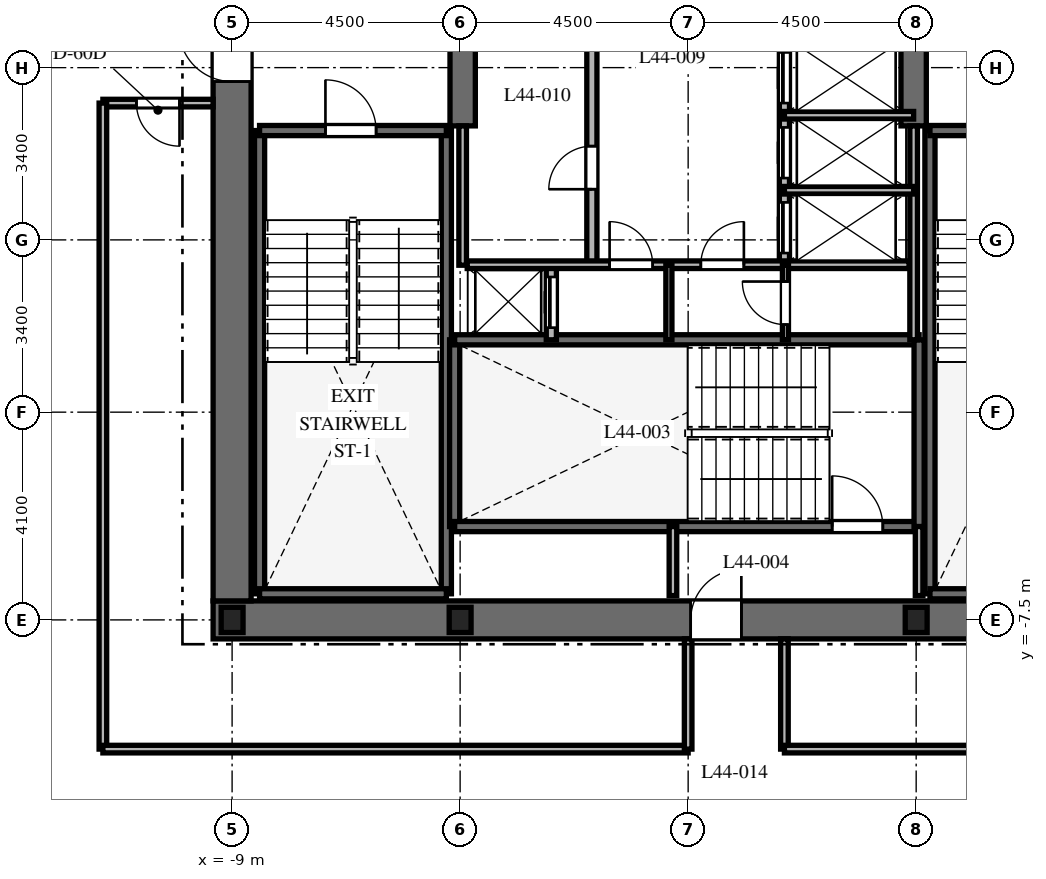
"""IFC4 building model, lengths in metres.
Left out: names, types, materials, properties, quantities, classifications, styles, units other than length and angle.
Written with IfcOpenShell. Run it as: python <this file> out.ifc"""

import sys

from ifc_helpers import new_model, si_unit, direction, frame, frame_2d, origin, origin_2d, place, context, subcontext, project, spatial, rectangle, i_section, extrude, element, fill, save


model = new_model("IFC4")
c1 = context("Model", 3, precision=1e-05, world=origin(), true_north=direction((0.0, 1.0)))
c2 = subcontext(c1, "Body", "Model", "MODEL_VIEW")
j1 = project(units=[si_unit("LENGTHUNIT", "METRE"), si_unit("PLANEANGLEUNIT", "RADIAN")], contexts=[c1])
p1 = place(None, origin())
s1 = spatial("IfcSite", under=j1, at=p1, CompositionType="ELEMENT")
p2 = place(p1, origin())
s2 = spatial("IfcBuilding", under=s1, at=p2, CompositionType="ELEMENT")
p3 = place(p2, frame((0.0, 0.0, 179.3)))
s3 = spatial("IfcBuildingStorey", under=s2, at=p3, CompositionType="ELEMENT", Elevation=179.3)
p4 = place(p3, frame((-9.375, -7.5, 0.0), z_axis=(0.0, 0.0, 1.0), x_axis=(1.0, 0.0, 0.0)))
e1 = element("IfcWall", 1, at=p4, inside=s3, PredefinedType="SHEAR", context=c2, shape_type="SweptSolid", body=[
    extrude(rectangle(XDim=18.75, YDim=0.75, at=frame_2d((9.375, 0.0))), origin(), (0.0, 0.0, 1.0), 3.7),
])
p5 = place(p4, frame((9.425, 0.0, 0.0)))
e2 = element("IfcOpeningElement", 2, at=p5, cuts=e1, PredefinedType="OPENING", context=c2, shape_type="SweptSolid", body=[
    extrude(rectangle(XDim=1.0, YDim=2.15, at=frame_2d((0.5, 1.075))), frame((0.0, 0.385, 0.0), z_axis=(0.0, -1.0, 0.0), x_axis=(1.0, 0.0, 0.0)), (0.0, 0.0, 1.0), 0.77),
])
p6 = place(p3, frame((-9.0, -7.125, 0.0), z_axis=(0.0, 0.0, 1.0), x_axis=(0.0, 1.0, 0.0)))
e3 = element("IfcWall", 3, at=p6, inside=s3, PredefinedType="SHEAR", context=c2, shape_type="SweptSolid", body=[
    extrude(rectangle(XDim=14.25, YDim=0.75, at=frame_2d((7.125, 0.0))), origin(), (0.0, 0.0, 1.0), 3.7),
])
p7 = place(p6, frame((10.25, 0.0, 0.0)))
e4 = element("IfcOpeningElement", 4, at=p7, cuts=e3, PredefinedType="OPENING", context=c2, shape_type="SweptSolid", body=[
    extrude(rectangle(XDim=1.05, YDim=2.15, at=frame_2d((0.525, 1.075))), frame((0.0, 0.385, 0.0), z_axis=(0.0, -1.0, 0.0), x_axis=(1.0, 0.0, 0.0)), (0.0, 0.0, 1.0), 0.77),
])
for number, where, z_axis, x_axis in (
    (5, (-4.45, 2.25, 0.0), (0.0, 0.0, 1.0), (0.0, 1.0, 0.0)),
    (6, (4.45, 2.25, 0.0), (0.0, 0.0, 1.0), (0.0, 1.0, 0.0)),
):
    element("IfcWall", number, at=place(p3, frame(where, z_axis=z_axis, x_axis=x_axis)), inside=s3, PredefinedType="SHEAR", context=c2, shape_type="SweptSolid", body=[
        extrude(rectangle(XDim=4.875, YDim=0.5, at=frame_2d((2.438, 0.0))), origin(), (0.0, 0.0, 1.0), 3.7),
    ])
for number, where, z_axis, x_axis in (
    (7, (-8.458, -6.985, 0.0), (0.0, 0.0, 1.0), (0.0, 1.0, 0.0)),
    (8, (-4.772, -6.985, 0.0), (0.0, 0.0, 1.0), (0.0, 1.0, 0.0)),
):
    element("IfcWall", number, at=place(p3, frame(where, z_axis=z_axis, x_axis=x_axis)), inside=s3, PredefinedType="SHEAR", context=c2, shape_type="SweptSolid", body=[
        extrude(rectangle(XDim=9.143, YDim=0.2, at=frame_2d((4.572, 0.0))), origin(), (0.0, 0.0, 1.0), 3.7),
    ])
p8 = place(p3, frame((-8.458, -6.985, 0.0), z_axis=(0.0, 0.0, 1.0), x_axis=(1.0, 0.0, 0.0)))
e9 = element("IfcWall", 9, at=p8, inside=s3, PredefinedType="SHEAR", context=c2, shape_type="SweptSolid", body=[
    extrude(rectangle(XDim=3.686, YDim=0.2, at=frame_2d((1.843, 0.0))), origin(), (0.0, 0.0, 1.0), 3.7),
])
p9 = place(p3, frame((-8.458, 2.158, 0.0), z_axis=(0.0, 0.0, 1.0), x_axis=(1.0, 0.0, 0.0)))
e10 = element("IfcWall", 10, at=p9, inside=s3, PredefinedType="SHEAR", context=c2, shape_type="SweptSolid", body=[
    extrude(rectangle(XDim=3.686, YDim=0.2, at=frame_2d((1.843, 0.0))), origin(), (0.0, 0.0, 1.0), 3.7),
])
p10 = place(p9, frame((1.3, 0.0, 0.0)))
e11 = element("IfcOpeningElement", 11, at=p10, cuts=e10, PredefinedType="OPENING", context=c2, shape_type="SweptSolid", body=[
    extrude(rectangle(XDim=1.0, YDim=2.15, at=frame_2d((0.5, 1.075))), frame((0.0, 0.11, 0.0), z_axis=(0.0, -1.0, 0.0), x_axis=(1.0, 0.0, 0.0)), (0.0, 0.0, 1.0), 0.22),
])
p11 = place(p3, frame((4.772, -6.985, 0.0), z_axis=(0.0, 0.0, 1.0), x_axis=(0.0, 1.0, 0.0)))
e12 = element("IfcWall", 12, at=p11, inside=s3, PredefinedType="SHEAR", context=c2, shape_type="SweptSolid", body=[
    extrude(rectangle(XDim=9.143, YDim=0.2, at=frame_2d((4.572, 0.0))), origin(), (0.0, 0.0, 1.0), 3.7),
])
p12 = place(p3, frame((4.772, -6.985, 0.0), z_axis=(0.0, 0.0, 1.0), x_axis=(1.0, 0.0, 0.0)))
e13 = element("IfcWall", 13, at=p12, inside=s3, PredefinedType="SHEAR", context=c2, shape_type="SweptSolid", body=[
    extrude(rectangle(XDim=3.686, YDim=0.2, at=frame_2d((1.843, 0.0))), origin(), (0.0, 0.0, 1.0), 3.7),
])
p13 = place(p3, frame((4.772, 2.158, 0.0), z_axis=(0.0, 0.0, 1.0), x_axis=(1.0, 0.0, 0.0)))
e14 = element("IfcWall", 14, at=p13, inside=s3, PredefinedType="SHEAR", context=c2, shape_type="SweptSolid", body=[
    extrude(rectangle(XDim=3.686, YDim=0.2, at=frame_2d((1.843, 0.0))), origin(), (0.0, 0.0, 1.0), 3.7),
])
p14 = place(p13, frame((1.35, 0.0, 0.0)))
e15 = element("IfcOpeningElement", 15, at=p14, cuts=e14, PredefinedType="OPENING", context=c2, shape_type="SweptSolid", body=[
    extrude(rectangle(XDim=1.0, YDim=2.15, at=frame_2d((0.5, 1.075))), frame((0.0, 0.11, 0.0), z_axis=(0.0, -1.0, 0.0), x_axis=(1.0, 0.0, 0.0)), (0.0, 0.0, 1.0), 0.22),
])
p15 = place(p3, frame((-4.608, -5.658, 0.0), z_axis=(0.0, 0.0, 1.0), x_axis=(0.0, 1.0, 0.0)))
e16 = element("IfcWall", 16, at=p15, inside=s3, PredefinedType="SHEAR", context=c2, shape_type="SweptSolid", body=[
    extrude(rectangle(XDim=3.686, YDim=0.2, at=frame_2d((1.843, 0.0))), origin(), (0.0, 0.0, 1.0), 3.7),
])
p16 = place(p3, frame((-4.608, -5.658, 0.0), z_axis=(0.0, 0.0, 1.0), x_axis=(1.0, 0.0, 0.0)))
e17 = element("IfcWall", 17, at=p16, inside=s3, PredefinedType="SHEAR", context=c2, shape_type="SweptSolid", body=[
    extrude(rectangle(XDim=9.166, YDim=0.2, at=frame_2d((4.583, 0.0))), origin(), (0.0, 0.0, 1.0), 3.7),
])
p17 = place(p16, frame((7.45, 0.0, 0.0)))
e18 = element("IfcOpeningElement", 18, at=p17, cuts=e17, PredefinedType="OPENING", context=c2, shape_type="SweptSolid", body=[
    extrude(rectangle(XDim=1.0, YDim=2.15, at=frame_2d((0.5, 1.075))), frame((0.0, 0.11, 0.0), z_axis=(0.0, -1.0, 0.0), x_axis=(1.0, 0.0, 0.0)), (0.0, 0.0, 1.0), 0.22),
])
p18 = place(p3, frame((-4.608, -1.972, 0.0), z_axis=(0.0, 0.0, 1.0), x_axis=(1.0, 0.0, 0.0)))
e19 = element("IfcWall", 19, at=p18, inside=s3, PredefinedType="SHEAR", context=c2, shape_type="SweptSolid", body=[
    extrude(rectangle(XDim=9.166, YDim=0.2, at=frame_2d((4.583, 0.0))), origin(), (0.0, 0.0, 1.0), 3.7),
])
p19 = place(p3, frame((4.558, -5.658, 0.0), z_axis=(0.0, 0.0, 1.0), x_axis=(0.0, 1.0, 0.0)))
e20 = element("IfcWall", 20, at=p19, inside=s3, PredefinedType="SHEAR", context=c2, shape_type="SweptSolid", body=[
    extrude(rectangle(XDim=3.686, YDim=0.2, at=frame_2d((1.843, 0.0))), origin(), (0.0, 0.0, 1.0), 3.7),
])
for number, where, z_axis, x_axis in (
    (21, (-9.0, -7.5, 0.0), (0.0, 0.0, 1.0), (1.0, 0.0, 0.0)),
    (22, (-4.5, -7.5, 0.0), (0.0, 0.0, 1.0), (1.0, 0.0, 0.0)),
    (23, (4.5, -7.5, 0.0), (0.0, 0.0, 1.0), (1.0, 0.0, 0.0)),
):
    element("IfcColumn", number, at=place(p3, frame(where, z_axis=z_axis, x_axis=x_axis)), inside=s3, PredefinedType="COLUMN", context=c2, shape_type="SweptSolid", body=[
        extrude(i_section(OverallWidth=0.432, OverallDepth=0.498, WebThickness=0.056, FlangeThickness=0.089, at=origin_2d()), origin(), (0.0, 0.0, 1.0), 3.7),
    ])
for number, where, z_axis, x_axis in (
    (24, (-0.3, -7.02, 0.0), (0.0, 0.0, 1.0), (0.0, 1.0, 0.0)),
    (25, (4.558, -7.02, 0.0), (0.0, 0.0, 1.0), (0.0, 1.0, 0.0)),
):
    element("IfcWall", number, at=place(p3, frame(where, z_axis=z_axis, x_axis=x_axis)), inside=s3, PredefinedType="PARTITIONING", context=c2, shape_type="SweptSolid", body=[
        extrude(rectangle(XDim=1.362, YDim=0.15, at=frame_2d((0.681, 0.0))), origin(), (0.0, 0.0, 1.0), 3.4),
    ])
p20 = place(p3, frame((-2.7, -1.972, 0.0), z_axis=(0.0, 0.0, 1.0), x_axis=(0.0, 1.0, 0.0)))
e26 = element("IfcWall", 26, at=p20, inside=s3, PredefinedType="PARTITIONING", context=c2, shape_type="SweptSolid", body=[
    extrude(rectangle(XDim=1.472, YDim=0.2, at=frame_2d((0.736, 0.0))), origin(), (0.0, 0.0, 1.0), 3.4),
])
p21 = place(p20, frame((0.24, 0.0, 0.0)))
e27 = element("IfcOpeningElement", 27, at=p21, cuts=e26, PredefinedType="OPENING", context=c2, shape_type="SweptSolid", body=[
    extrude(rectangle(XDim=1.0, YDim=2.2, at=frame_2d((0.5, 1.1))), frame((0.0, 0.11, 0.0), z_axis=(0.0, -1.0, 0.0), x_axis=(1.0, 0.0, 0.0)), (0.0, 0.0, 1.0), 0.22),
])
p22 = place(p3, frame((-4.45, -0.5, 0.0), z_axis=(0.0, 0.0, 1.0), x_axis=(0.0, 1.0, 0.0)))
e28 = element("IfcWall", 28, at=p22, inside=s3, PredefinedType="PARTITIONING", context=c2, shape_type="SweptSolid", body=[
    extrude(rectangle(XDim=2.75, YDim=0.15, at=frame_2d((1.375, 0.0))), origin(), (0.0, 0.0, 1.0), 3.4),
])
p23 = place(p3, frame((4.45, -1.972, 0.0), z_axis=(0.0, 0.0, 1.0), x_axis=(0.0, 1.0, 0.0)))
e29 = element("IfcWall", 29, at=p23, inside=s3, PredefinedType="PARTITIONING", context=c2, shape_type="SweptSolid", body=[
    extrude(rectangle(XDim=4.222, YDim=0.15, at=frame_2d((2.111, 0.0))), origin(), (0.0, 0.0, 1.0), 3.4),
])
p24 = place(p3, frame((-1.9, -0.5, 0.0), z_axis=(0.0, 0.0, 1.0), x_axis=(0.0, 1.0, 0.0)))
e30 = element("IfcWall", 30, at=p24, inside=s3, PredefinedType="PARTITIONING", context=c2, shape_type="SweptSolid", body=[
    extrude(rectangle(XDim=4.44, YDim=0.2, at=frame_2d((2.22, 0.0))), origin(), (0.0, 0.0, 1.0), 3.4),
])
p25 = place(p24, frame((1.5, 0.0, 0.0)))
e31 = element("IfcOpeningElement", 31, at=p25, cuts=e30, PredefinedType="OPENING", context=c2, shape_type="SweptSolid", body=[
    extrude(rectangle(XDim=0.85, YDim=2.03, at=frame_2d((0.425, 1.015))), frame((0.0, 0.11, 0.0), z_axis=(0.0, -1.0, 0.0), x_axis=(1.0, 0.0, 0.0)), (0.0, 0.0, 1.0), 0.22),
])
p26 = place(p3, frame((1.9, -0.5, 0.0), z_axis=(0.0, 0.0, 1.0), x_axis=(0.0, 1.0, 0.0)))
e32 = element("IfcWall", 32, at=p26, inside=s3, PredefinedType="PARTITIONING", context=c2, shape_type="SweptSolid", body=[
    extrude(rectangle(XDim=4.44, YDim=0.2, at=frame_2d((2.22, 0.0))), origin(), (0.0, 0.0, 1.0), 3.4),
])
p27 = place(p26, frame((0.24, 0.0, 0.0)))
e33 = element("IfcOpeningElement", 33, at=p27, cuts=e32, PredefinedType="OPENING", context=c2, shape_type="SweptSolid", body=[
    extrude(rectangle(XDim=1.0, YDim=2.2, at=frame_2d((0.5, 1.1))), frame((0.0, 0.11, 0.0), z_axis=(0.0, -1.0, 0.0), x_axis=(1.0, 0.0, 0.0)), (0.0, 0.0, 1.0), 0.22),
])
p28 = place(p26, frame((1.72, 0.0, 0.0)))
e34 = element("IfcOpeningElement", 34, at=p28, cuts=e32, PredefinedType="OPENING", context=c2, shape_type="SweptSolid", body=[
    extrude(rectangle(XDim=1.0, YDim=2.2, at=frame_2d((0.5, 1.1))), frame((0.0, 0.11, 0.0), z_axis=(0.0, -1.0, 0.0), x_axis=(1.0, 0.0, 0.0)), (0.0, 0.0, 1.0), 0.22),
])
p29 = place(p26, frame((3.2, 0.0, 0.0)))
e35 = element("IfcOpeningElement", 35, at=p29, cuts=e32, PredefinedType="OPENING", context=c2, shape_type="SweptSolid", body=[
    extrude(rectangle(XDim=1.0, YDim=2.2, at=frame_2d((0.5, 1.1))), frame((0.0, 0.11, 0.0), z_axis=(0.0, -1.0, 0.0), x_axis=(1.0, 0.0, 0.0)), (0.0, 0.0, 1.0), 0.22),
])
for number, where, z_axis, x_axis in (
    (36, (1.9, 0.98, 0.0), (0.0, 0.0, 1.0), (1.0, 0.0, 0.0)),
    (37, (1.9, 2.46, 0.0), (0.0, 0.0, 1.0), (1.0, 0.0, 0.0)),
):
    element("IfcWall", number, at=place(p3, frame(where, z_axis=z_axis, x_axis=x_axis)), inside=s3, PredefinedType="PARTITIONING", context=c2, shape_type="SweptSolid", body=[
        extrude(rectangle(XDim=2.55, YDim=0.15, at=frame_2d((1.275, 0.0))), origin(), (0.0, 0.0, 1.0), 3.4),
    ])
p30 = place(p3, frame((-4.36, -0.49, 0.0), z_axis=(0.0, 0.0, 1.0), x_axis=(1.0, 0.0, 0.0)))
e38 = element("IfcWall", 38, at=p30, inside=s3, PredefinedType="PARTITIONING", context=c2, shape_type="SweptSolid", body=[
    extrude(rectangle(XDim=8.72, YDim=0.15, at=frame_2d((4.36, 0.0))), origin(), (0.0, 0.0, 1.0), 3.4),
])
p31 = place(p30, frame((2.81, 0.0, 0.0)))
e39 = element("IfcOpeningElement", 39, at=p31, cuts=e38, PredefinedType="OPENING", context=c2, shape_type="SweptSolid", body=[
    extrude(rectangle(XDim=0.85, YDim=2.03, at=frame_2d((0.425, 1.015))), frame((0.0, 0.085, 0.0), z_axis=(0.0, -1.0, 0.0), x_axis=(1.0, 0.0, 0.0)), (0.0, 0.0, 1.0), 0.17),
])
p32 = place(p30, frame((4.61, 0.0, 0.0)))
e40 = element("IfcOpeningElement", 40, at=p32, cuts=e38, PredefinedType="OPENING", context=c2, shape_type="SweptSolid", body=[
    extrude(rectangle(XDim=0.85, YDim=2.03, at=frame_2d((0.425, 1.015))), frame((0.0, 0.085, 0.0), z_axis=(0.0, -1.0, 0.0), x_axis=(1.0, 0.0, 0.0)), (0.0, 0.0, 1.0), 0.17),
])
p33 = place(p3, frame((-0.38, -1.972, 0.0), z_axis=(0.0, 0.0, 1.0), x_axis=(0.0, 1.0, 0.0)))
e41 = element("IfcWall", 41, at=p33, inside=s3, PredefinedType="PARTITIONING", context=c2, shape_type="SweptSolid", body=[
    extrude(rectangle(XDim=1.472, YDim=0.12, at=frame_2d((0.736, 0.0))), origin(), (0.0, 0.0, 1.0), 3.4),
])
p34 = place(p3, frame((1.92, -1.972, 0.0), z_axis=(0.0, 0.0, 1.0), x_axis=(0.0, 1.0, 0.0)))
e42 = element("IfcWall", 42, at=p34, inside=s3, PredefinedType="PARTITIONING", context=c2, shape_type="SweptSolid", body=[
    extrude(rectangle(XDim=1.472, YDim=0.12, at=frame_2d((0.736, 0.0))), origin(), (0.0, 0.0, 1.0), 3.4),
])
p35 = place(p34, frame((0.3, 0.0, 0.0)))
e43 = element("IfcOpeningElement", 43, at=p35, cuts=e42, PredefinedType="OPENING", context=c2, shape_type="SweptSolid", body=[
    extrude(rectangle(XDim=0.85, YDim=2.03, at=frame_2d((0.425, 1.015))), frame((0.0, 0.07, 0.0), z_axis=(0.0, -1.0, 0.0), x_axis=(1.0, 0.0, 0.0)), (0.0, 0.0, 1.0), 0.14),
])
p36 = place(p3, frame((-9.375, 2.7, 0.0), z_axis=(0.0, 0.0, 1.0), x_axis=(-1.0, 0.0, 0.0)))
e44 = element("IfcWall", 44, at=p36, inside=s3, PredefinedType="PARTITIONING", context=c2, shape_type="SweptSolid", body=[
    extrude(rectangle(XDim=2.175, YDim=0.15, at=frame_2d((1.087, 0.0))), origin(), (0.0, 0.0, 1.0), 3.4),
])
p37 = place(p36, frame((0.663, 0.0, 0.0)))
e45 = element("IfcOpeningElement", 45, at=p37, cuts=e44, PredefinedType="OPENING", context=c2, shape_type="SweptSolid", body=[
    extrude(rectangle(XDim=0.85, YDim=2.03, at=frame_2d((0.425, 1.015))), frame((0.0, 0.085, 0.0), z_axis=(0.0, -1.0, 0.0), x_axis=(1.0, 0.0, 0.0)), (0.0, 0.0, 1.0), 0.17),
])
p38 = place(p3, frame((-11.55, 2.7, 0.0), z_axis=(0.0, 0.0, 1.0), x_axis=(0.0, -1.0, 0.0)))
e46 = element("IfcWall", 46, at=p38, inside=s3, PredefinedType="PARTITIONING", context=c2, shape_type="SweptSolid", body=[
    extrude(rectangle(XDim=12.75, YDim=0.15, at=frame_2d((6.375, 0.0))), origin(), (0.0, 0.0, 1.0), 2.84),
])
p39 = place(p3, frame((-11.55, -10.05, 0.0), z_axis=(0.0, 0.0, 1.0), x_axis=(1.0, 0.0, 0.0)))
e47 = element("IfcWall", 47, at=p39, inside=s3, PredefinedType="PARTITIONING", context=c2, shape_type="SweptSolid", body=[
    extrude(rectangle(XDim=11.55, YDim=0.15, at=frame_2d((5.775, 0.0))), origin(), (0.0, 0.0, 1.0), 2.84),
])
for number, where, z_axis, x_axis in (
    (48, (0.0, -10.05, 0.0), (0.0, 0.0, 1.0), (0.0, 1.0, 0.0)),
    (49, (1.9, -7.875, 0.0), (0.0, 0.0, 1.0), (0.0, -1.0, 0.0)),
):
    element("IfcWall", number, at=place(p3, frame(where, z_axis=z_axis, x_axis=x_axis)), inside=s3, PredefinedType="PARTITIONING", context=c2, shape_type="SweptSolid", body=[
        extrude(rectangle(XDim=2.175, YDim=0.15, at=frame_2d((1.087, 0.0))), origin(), (0.0, 0.0, 1.0), 3.4),
    ])
p40 = place(p3, frame((1.9, -10.05, 0.0), z_axis=(0.0, 0.0, 1.0), x_axis=(1.0, 0.0, 0.0)))
e50 = element("IfcWall", 50, at=p40, inside=s3, PredefinedType="PARTITIONING", context=c2, shape_type="SweptSolid", body=[
    extrude(rectangle(XDim=9.65, YDim=0.15, at=frame_2d((4.825, 0.0))), origin(), (0.0, 0.0, 1.0), 2.84),
])
p41 = place(p10, origin())
e51 = element("IfcDoor", 51, at=p41, inside=s3, OperationType="SINGLE_SWING_LEFT", PredefinedType="DOOR", context=c2, shape_type="SweptSolid", body=[
    extrude(rectangle(XDim=1.0, YDim=2.15, at=frame_2d((0.5, 1.075))), frame((0.0, 0.025, 0.0), z_axis=(0.0, -1.0, 0.0), x_axis=(1.0, 0.0, 0.0)), (0.0, 0.0, 1.0), 0.05),
])
fill(e11, e51)
p42 = place(p17, origin())
e52 = element("IfcDoor", 52, at=p42, inside=s3, OperationType="SINGLE_SWING_LEFT", PredefinedType="DOOR", context=c2, shape_type="SweptSolid", body=[
    extrude(rectangle(XDim=1.0, YDim=2.15, at=frame_2d((0.5, 1.075))), frame((0.0, 0.025, 0.0), z_axis=(0.0, -1.0, 0.0), x_axis=(1.0, 0.0, 0.0)), (0.0, 0.0, 1.0), 0.05),
])
fill(e18, e52)
p43 = place(p5, origin())
e53 = element("IfcDoor", 53, at=p43, inside=s3, OperationType="SINGLE_SWING_RIGHT", PredefinedType="DOOR", context=c2, shape_type="SweptSolid", body=[
    extrude(rectangle(XDim=1.0, YDim=2.15, at=frame_2d((0.5, 1.075))), frame((0.0, 0.025, 0.0), z_axis=(0.0, -1.0, 0.0), x_axis=(1.0, 0.0, 0.0)), (0.0, 0.0, 1.0), 0.05),
])
fill(e2, e53)
p44 = place(p7, origin())
e54 = element("IfcDoor", 54, at=p44, inside=s3, OperationType="SINGLE_SWING_RIGHT", PredefinedType="DOOR", context=c2, shape_type="SweptSolid", body=[
    extrude(rectangle(XDim=1.05, YDim=2.15, at=frame_2d((0.525, 1.075))), frame((0.0, 0.025, 0.0), z_axis=(0.0, -1.0, 0.0), x_axis=(1.0, 0.0, 0.0)), (0.0, 0.0, 1.0), 0.05),
])
fill(e4, e54)
p45 = place(p21, origin())
e55 = element("IfcDoor", 55, at=p45, inside=s3, OperationType="SLIDING_TO_LEFT", PredefinedType="DOOR", context=c2, shape_type="SweptSolid", body=[
    extrude(rectangle(XDim=1.0, YDim=2.2, at=frame_2d((0.5, 1.1))), frame((0.0, 0.025, 0.0), z_axis=(0.0, -1.0, 0.0), x_axis=(1.0, 0.0, 0.0)), (0.0, 0.0, 1.0), 0.05),
])
fill(e27, e55)
p46 = place(p25, origin())
e56 = element("IfcDoor", 56, at=p46, inside=s3, OperationType="SINGLE_SWING_LEFT", PredefinedType="DOOR", context=c2, shape_type="SweptSolid", body=[
    extrude(rectangle(XDim=0.85, YDim=2.03, at=frame_2d((0.425, 1.015))), frame((0.0, 0.025, 0.0), z_axis=(0.0, -1.0, 0.0), x_axis=(1.0, 0.0, 0.0)), (0.0, 0.0, 1.0), 0.05),
])
fill(e31, e56)
p47 = place(p27, origin())
e57 = element("IfcDoor", 57, at=p47, inside=s3, OperationType="SLIDING_TO_RIGHT", PredefinedType="DOOR", context=c2, shape_type="SweptSolid", body=[
    extrude(rectangle(XDim=1.0, YDim=2.2, at=frame_2d((0.5, 1.1))), frame((0.0, 0.025, 0.0), z_axis=(0.0, -1.0, 0.0), x_axis=(1.0, 0.0, 0.0)), (0.0, 0.0, 1.0), 0.05),
])
fill(e33, e57)
p48 = place(p28, origin())
e58 = element("IfcDoor", 58, at=p48, inside=s3, OperationType="SLIDING_TO_RIGHT", PredefinedType="DOOR", context=c2, shape_type="SweptSolid", body=[
    extrude(rectangle(XDim=1.0, YDim=2.2, at=frame_2d((0.5, 1.1))), frame((0.0, 0.025, 0.0), z_axis=(0.0, -1.0, 0.0), x_axis=(1.0, 0.0, 0.0)), (0.0, 0.0, 1.0), 0.05),
])
fill(e34, e58)
p49 = place(p29, origin())
e59 = element("IfcDoor", 59, at=p49, inside=s3, OperationType="SLIDING_TO_RIGHT", PredefinedType="DOOR", context=c2, shape_type="SweptSolid", body=[
    extrude(rectangle(XDim=1.0, YDim=2.2, at=frame_2d((0.5, 1.1))), frame((0.0, 0.025, 0.0), z_axis=(0.0, -1.0, 0.0), x_axis=(1.0, 0.0, 0.0)), (0.0, 0.0, 1.0), 0.05),
])
fill(e35, e59)
p50 = place(p31, origin())
e60 = element("IfcDoor", 60, at=p50, inside=s3, OperationType="SINGLE_SWING_LEFT", PredefinedType="DOOR", context=c2, shape_type="SweptSolid", body=[
    extrude(rectangle(XDim=0.85, YDim=2.03, at=frame_2d((0.425, 1.015))), frame((0.0, 0.025, 0.0), z_axis=(0.0, -1.0, 0.0), x_axis=(1.0, 0.0, 0.0)), (0.0, 0.0, 1.0), 0.05),
])
fill(e39, e60)
p51 = place(p32, origin())
e61 = element("IfcDoor", 61, at=p51, inside=s3, OperationType="SINGLE_SWING_RIGHT", PredefinedType="DOOR", context=c2, shape_type="SweptSolid", body=[
    extrude(rectangle(XDim=0.85, YDim=2.03, at=frame_2d((0.425, 1.015))), frame((0.0, 0.025, 0.0), z_axis=(0.0, -1.0, 0.0), x_axis=(1.0, 0.0, 0.0)), (0.0, 0.0, 1.0), 0.05),
])
fill(e40, e61)
p52 = place(p35, origin())
e62 = element("IfcDoor", 62, at=p52, inside=s3, OperationType="SINGLE_SWING_RIGHT", PredefinedType="DOOR", context=c2, shape_type="SweptSolid", body=[
    extrude(rectangle(XDim=0.85, YDim=2.03, at=frame_2d((0.425, 1.015))), frame((0.0, 0.025, 0.0), z_axis=(0.0, -1.0, 0.0), x_axis=(1.0, 0.0, 0.0)), (0.0, 0.0, 1.0), 0.05),
])
fill(e43, e62)
p53 = place(p37, origin())
e63 = element("IfcDoor", 63, at=p53, inside=s3, OperationType="SINGLE_SWING_LEFT", PredefinedType="DOOR", context=c2, shape_type="SweptSolid", body=[
    extrude(rectangle(XDim=0.85, YDim=2.03, at=frame_2d((0.425, 1.015))), frame((0.0, 0.025, 0.0), z_axis=(0.0, -1.0, 0.0), x_axis=(1.0, 0.0, 0.0)), (0.0, 0.0, 1.0), 0.05),
])
fill(e45, e63)
save(model, sys.argv[1])
